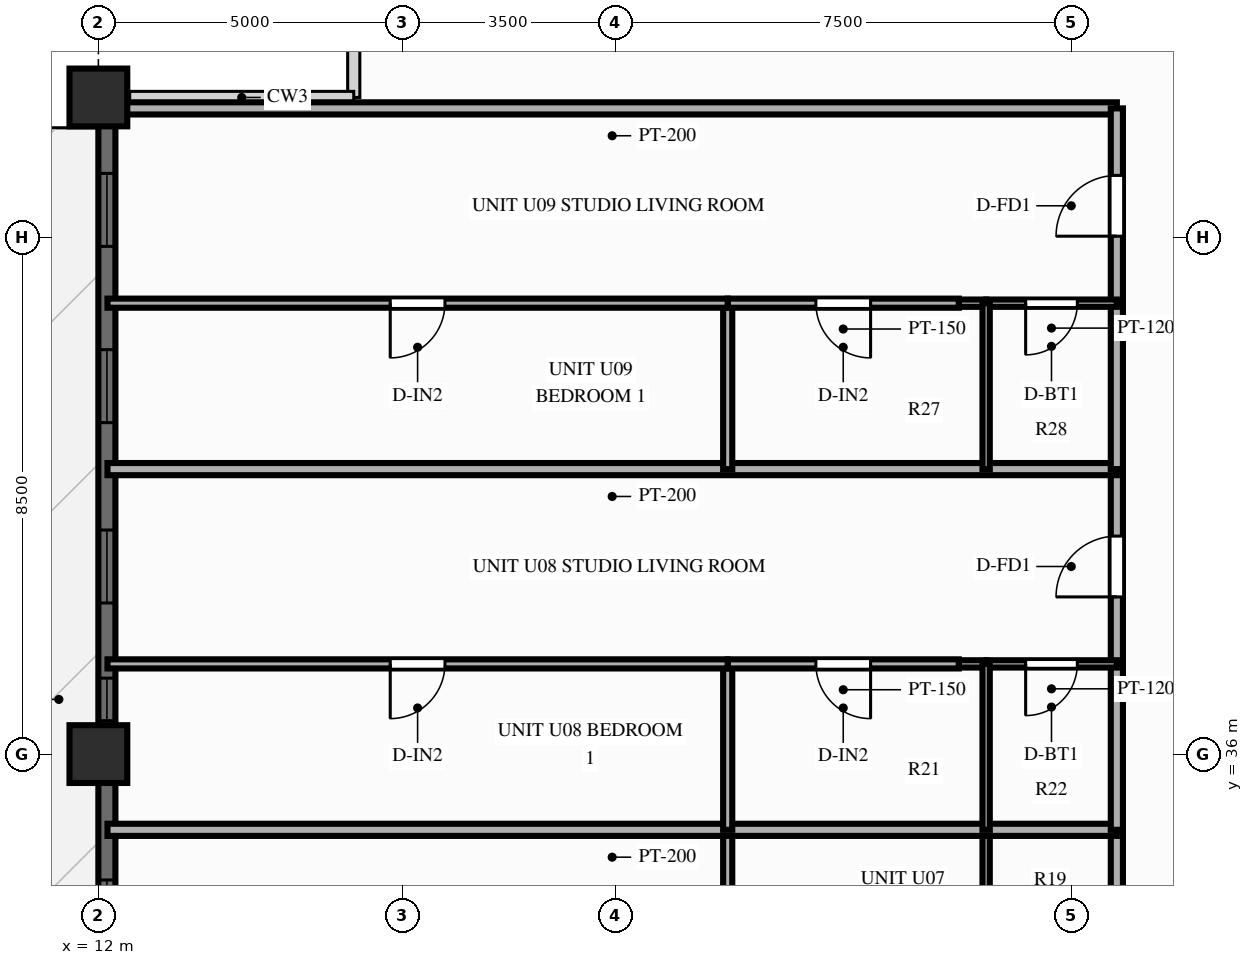
"""IFC4 building model, lengths in metres.
Left out: names, types, materials, properties, quantities, classifications, styles, units other than length and angle.
Written with IfcOpenShell. Run it as: python <this file> out.ifc"""

import sys

from ifc_helpers import new_model, si_unit, direction, frame, frame_2d, origin, origin_2d, place, context, subcontext, project, spatial, rectangle, extrude, source, transform, mapped, element, fill, save


model = new_model("IFC4")
c1 = context("Model", 3, precision=1e-05, world=origin(), true_north=direction((0.0, 1.0)))
c2 = subcontext(c1, "Body", "Model", "MODEL_VIEW")
j1 = project(units=[si_unit("LENGTHUNIT", "METRE"), si_unit("PLANEANGLEUNIT", "RADIAN")], contexts=[c1])
p1 = place(None, origin())
s1 = spatial("IfcSite", under=j1, at=p1, CompositionType="ELEMENT")
p2 = place(p1, origin())
s2 = spatial("IfcBuilding", under=s1, at=p2, CompositionType="ELEMENT")
p3 = place(p2, frame((0.0, 0.0, 116.85)))
s3 = spatial("IfcBuildingStorey", under=s2, at=p3, CompositionType="ELEMENT", Elevation=116.85)
m1 = source(origin(), c2, "Body", "SweptSolid", [
    extrude(rectangle(XDim=0.95, YDim=0.95, at=origin_2d()), origin(), (0.0, 0.0, 1.0), 3.0),
])
for number, where, z_axis, x_axis in (
    (1, (12.0, 46.8, 0.0), (0.0, 0.0, 1.0), (1.0, 0.0, 0.0)),
    (2, (12.0, 36.0, 0.0), (0.0, 0.0, 1.0), (1.0, 0.0, 0.0)),
):
    element("IfcColumn", number, at=place(p3, frame(where, z_axis=z_axis, x_axis=x_axis)), inside=s3, PredefinedType="COLUMN", context=c2, shape_type="MappedRepresentation", body=[
        mapped(m1, transform((0.0, 0.0, 0.0), scale=1.0)),
    ])
p4 = place(p3, frame((12.14, 7.2, 0.0), z_axis=(0.0, 0.0, 1.0), x_axis=(0.0, 1.0, 0.0)))
e3 = element("IfcWall", 3, at=p4, inside=s3, PredefinedType="SOLIDWALL", context=c2, shape_type="SweptSolid", body=[
    extrude(rectangle(XDim=39.6, YDim=0.28, at=frame_2d((19.8, 0.0))), origin(), (0.0, 0.0, 1.0), 2.28),
])
p5 = place(p4, frame((0.945, 0.0, 0.25)))
e4 = element("IfcOpeningElement", 4, at=p5, cuts=e3, PredefinedType="OPENING", context=c2, shape_type="SweptSolid", body=[
    extrude(rectangle(XDim=1.2, YDim=1.5, at=frame_2d((0.6, 0.75))), frame((0.0, 0.152, 0.0), z_axis=(0.0, -1.0, 0.0), x_axis=(1.0, 0.0, 0.0)), (0.0, 0.0, 1.0), 0.304),
])
p6 = place(p4, frame((4.213, 0.0, 0.25)))
e5 = element("IfcOpeningElement", 5, at=p6, cuts=e3, PredefinedType="OPENING", context=c2, shape_type="SweptSolid", body=[
    extrude(rectangle(XDim=1.2, YDim=1.5, at=frame_2d((0.6, 0.75))), frame((0.0, 0.152, 0.0), z_axis=(0.0, -1.0, 0.0), x_axis=(1.0, 0.0, 0.0)), (0.0, 0.0, 1.0), 0.304),
])
p7 = place(p4, frame((7.55, 0.0, 0.25)))
e6 = element("IfcOpeningElement", 6, at=p7, cuts=e3, PredefinedType="OPENING", context=c2, shape_type="SweptSolid", body=[
    extrude(rectangle(XDim=1.2, YDim=1.5, at=frame_2d((0.6, 0.75))), frame((0.0, 0.152, 0.0), z_axis=(0.0, -1.0, 0.0), x_axis=(1.0, 0.0, 0.0)), (0.0, 0.0, 1.0), 0.304),
])
p8 = place(p4, frame((13.483, 0.0, 0.25)))
e7 = element("IfcOpeningElement", 7, at=p8, cuts=e3, PredefinedType="OPENING", context=c2, shape_type="SweptSolid", body=[
    extrude(rectangle(XDim=1.2, YDim=1.5, at=frame_2d((0.6, 0.75))), frame((0.0, 0.152, 0.0), z_axis=(0.0, -1.0, 0.0), x_axis=(1.0, 0.0, 0.0)), (0.0, 0.0, 1.0), 0.304),
])
p9 = place(p4, frame((16.82, 0.0, 0.25)))
e8 = element("IfcOpeningElement", 8, at=p9, cuts=e3, PredefinedType="OPENING", context=c2, shape_type="SweptSolid", body=[
    extrude(rectangle(XDim=1.2, YDim=1.5, at=frame_2d((0.6, 0.75))), frame((0.0, 0.152, 0.0), z_axis=(0.0, -1.0, 0.0), x_axis=(1.0, 0.0, 0.0)), (0.0, 0.0, 1.0), 0.304),
])
p10 = place(p4, frame((19.2, 0.0, 0.25)))
e9 = element("IfcOpeningElement", 9, at=p10, cuts=e3, PredefinedType="OPENING", context=c2, shape_type="SweptSolid", body=[
    extrude(rectangle(XDim=1.2, YDim=1.5, at=frame_2d((0.6, 0.75))), frame((0.0, 0.152, 0.0), z_axis=(0.0, -1.0, 0.0), x_axis=(1.0, 0.0, 0.0)), (0.0, 0.0, 1.0), 0.304),
])
p11 = place(p4, frame((21.992, 0.0, 0.0)))
e10 = element("IfcOpeningElement", 10, at=p11, cuts=e3, PredefinedType="OPENING", context=c2, shape_type="SweptSolid", body=[
    extrude(rectangle(XDim=1.6, YDim=2.15, at=frame_2d((0.8, 1.075))), frame((0.0, 0.152, 0.0), z_axis=(0.0, -1.0, 0.0), x_axis=(1.0, 0.0, 0.0)), (0.0, 0.0, 1.0), 0.304),
])
p12 = place(p4, frame((25.529, 0.0, 0.25)))
e11 = element("IfcOpeningElement", 11, at=p12, cuts=e3, PredefinedType="OPENING", context=c2, shape_type="SweptSolid", body=[
    extrude(rectangle(XDim=1.2, YDim=1.5, at=frame_2d((0.6, 0.75))), frame((0.0, 0.152, 0.0), z_axis=(0.0, -1.0, 0.0), x_axis=(1.0, 0.0, 0.0)), (0.0, 0.0, 1.0), 0.304),
])
p13 = place(p4, frame((29.349, 0.0, 0.25)))
e12 = element("IfcOpeningElement", 12, at=p13, cuts=e3, PredefinedType="OPENING", context=c2, shape_type="SweptSolid", body=[
    extrude(rectangle(XDim=0.7, YDim=1.5, at=frame_2d((0.35, 0.75))), frame((0.0, 0.152, 0.0), z_axis=(0.0, -1.0, 0.0), x_axis=(1.0, 0.0, 0.0)), (0.0, 0.0, 1.0), 0.304),
])
p14 = place(p4, frame((31.285, 0.0, 0.25)))
e13 = element("IfcOpeningElement", 13, at=p14, cuts=e3, PredefinedType="OPENING", context=c2, shape_type="SweptSolid", body=[
    extrude(rectangle(XDim=1.2, YDim=1.5, at=frame_2d((0.6, 0.75))), frame((0.0, 0.152, 0.0), z_axis=(0.0, -1.0, 0.0), x_axis=(1.0, 0.0, 0.0)), (0.0, 0.0, 1.0), 0.304),
])
p15 = place(p4, frame((34.252, 0.0, 0.25)))
e14 = element("IfcOpeningElement", 14, at=p15, cuts=e3, PredefinedType="OPENING", context=c2, shape_type="SweptSolid", body=[
    extrude(rectangle(XDim=1.2, YDim=1.5, at=frame_2d((0.6, 0.75))), frame((0.0, 0.152, 0.0), z_axis=(0.0, -1.0, 0.0), x_axis=(1.0, 0.0, 0.0)), (0.0, 0.0, 1.0), 0.304),
])
p16 = place(p4, frame((37.151, 0.0, 0.25)))
e15 = element("IfcOpeningElement", 15, at=p16, cuts=e3, PredefinedType="OPENING", context=c2, shape_type="SweptSolid", body=[
    extrude(rectangle(XDim=1.2, YDim=1.5, at=frame_2d((0.6, 0.75))), frame((0.0, 0.152, 0.0), z_axis=(0.0, -1.0, 0.0), x_axis=(1.0, 0.0, 0.0)), (0.0, 0.0, 1.0), 0.304),
])
p17 = place(p3, frame((28.75, 46.62, 0.0), z_axis=(0.0, 0.0, 1.0), x_axis=(-1.0, 0.0, 0.0)))
e16 = element("IfcWall", 16, at=p17, inside=s3, PredefinedType="PARTITIONING", context=c2, shape_type="SweptSolid", body=[
    extrude(rectangle(XDim=16.6, YDim=0.2, at=frame_2d((8.3, 0.0))), origin(), (0.0, 0.0, 1.0), 2.79),
])
p18 = place(p3, frame((28.75, 31.904, 0.0), z_axis=(0.0, 0.0, 1.0), x_axis=(0.0, 1.0, 0.0)))
e17 = element("IfcWall", 17, at=p18, inside=s3, PredefinedType="PARTITIONING", context=c2, shape_type="SweptSolid", body=[
    extrude(rectangle(XDim=2.85, YDim=0.2, at=frame_2d((1.425, 0.0))), origin(), (0.0, 0.0, 1.0), 2.79),
])
p19 = place(p3, frame((26.6, 31.904, 0.0), z_axis=(0.0, 0.0, 1.0), x_axis=(0.0, 1.0, 0.0)))
e18 = element("IfcWall", 18, at=p19, inside=s3, PredefinedType="PARTITIONING", context=c2, shape_type="SweptSolid", body=[
    extrude(rectangle(XDim=2.85, YDim=0.12, at=frame_2d((1.425, 0.0))), origin(), (0.0, 0.0, 1.0), 2.79),
])
p20 = place(p3, frame((22.35, 31.904, 0.0), z_axis=(0.0, 0.0, 1.0), x_axis=(0.0, 1.0, 0.0)))
e19 = element("IfcWall", 19, at=p20, inside=s3, PredefinedType="PARTITIONING", context=c2, shape_type="SweptSolid", body=[
    extrude(rectangle(XDim=2.85, YDim=0.15, at=frame_2d((1.425, 0.0))), origin(), (0.0, 0.0, 1.0), 2.79),
])
p21 = place(p3, frame((28.75, 34.754, 0.0), z_axis=(0.0, 0.0, 1.0), x_axis=(-1.0, 0.0, 0.0)))
e20 = element("IfcWall", 20, at=p21, inside=s3, PredefinedType="PARTITIONING", context=c2, shape_type="SweptSolid", body=[
    extrude(rectangle(XDim=16.6, YDim=0.2, at=frame_2d((8.3, 0.0))), origin(), (0.0, 0.0, 1.0), 2.79),
])
p22 = place(p3, frame((28.75, 34.754, 0.0), z_axis=(0.0, 0.0, 1.0), x_axis=(0.0, 1.0, 0.0)))
e21 = element("IfcWall", 21, at=p22, inside=s3, PredefinedType="PARTITIONING", context=c2, shape_type="SweptSolid", body=[
    extrude(rectangle(XDim=2.729, YDim=0.2, at=frame_2d((1.365, 0.0))), origin(), (0.0, 0.0, 1.0), 2.79),
])
p23 = place(p3, frame((28.75, 37.483, 0.0), z_axis=(0.0, 0.0, 1.0), x_axis=(0.0, 1.0, 0.0)))
e22 = element("IfcWall", 22, at=p23, inside=s3, PredefinedType="PARTITIONING", context=c2, shape_type="SweptSolid", body=[
    extrude(rectangle(XDim=3.204, YDim=0.2, at=frame_2d((1.602, 0.0))), origin(), (0.0, 0.0, 1.0), 2.79),
])
p24 = place(p23, frame((1.102, 0.0, 0.0)))
e23 = element("IfcOpeningElement", 23, at=p24, cuts=e22, PredefinedType="OPENING", context=c2, shape_type="SweptSolid", body=[
    extrude(rectangle(XDim=1.0, YDim=2.15, at=frame_2d((0.5, 1.075))), frame((0.0, 0.112, 0.0), z_axis=(0.0, -1.0, 0.0), x_axis=(1.0, 0.0, 0.0)), (0.0, 0.0, 1.0), 0.224),
])
p25 = place(p3, frame((28.75, 37.483, 0.0), z_axis=(0.0, 0.0, 1.0), x_axis=(-1.0, 0.0, 0.0)))
e24 = element("IfcWall", 24, at=p25, inside=s3, PredefinedType="PARTITIONING", context=c2, shape_type="SweptSolid", body=[
    extrude(rectangle(XDim=2.15, YDim=0.12, at=frame_2d((1.075, 0.0))), origin(), (0.0, 0.0, 1.0), 2.79),
])
p26 = place(p25, frame((0.65, 0.0, 0.0)))
e25 = element("IfcOpeningElement", 25, at=p26, cuts=e24, PredefinedType="OPENING", context=c2, shape_type="SweptSolid", body=[
    extrude(rectangle(XDim=0.85, YDim=2.05, at=frame_2d((0.425, 1.025))), frame((0.0, 0.072, 0.0), z_axis=(0.0, -1.0, 0.0), x_axis=(1.0, 0.0, 0.0)), (0.0, 0.0, 1.0), 0.144),
])
p27 = place(p3, frame((26.6, 37.483, 0.0), z_axis=(0.0, 0.0, 1.0), x_axis=(-1.0, 0.0, 0.0)))
e26 = element("IfcWall", 26, at=p27, inside=s3, PredefinedType="PARTITIONING", context=c2, shape_type="SweptSolid", body=[
    extrude(rectangle(XDim=0.45, YDim=0.12, at=frame_2d((0.225, 0.0))), origin(), (0.0, 0.0, 1.0), 2.79),
])
p28 = place(p3, frame((26.6, 34.754, 0.0), z_axis=(0.0, 0.0, 1.0), x_axis=(0.0, 1.0, 0.0)))
e27 = element("IfcWall", 27, at=p28, inside=s3, PredefinedType="PARTITIONING", context=c2, shape_type="SweptSolid", body=[
    extrude(rectangle(XDim=2.729, YDim=0.12, at=frame_2d((1.365, 0.0))), origin(), (0.0, 0.0, 1.0), 2.79),
])
p29 = place(p3, frame((22.35, 34.754, 0.0), z_axis=(0.0, 0.0, 1.0), x_axis=(0.0, 1.0, 0.0)))
e28 = element("IfcWall", 28, at=p29, inside=s3, PredefinedType="PARTITIONING", context=c2, shape_type="SweptSolid", body=[
    extrude(rectangle(XDim=2.729, YDim=0.15, at=frame_2d((1.365, 0.0))), origin(), (0.0, 0.0, 1.0), 2.79),
])
p30 = place(p3, frame((26.15, 37.483, 0.0), z_axis=(0.0, 0.0, 1.0), x_axis=(-1.0, 0.0, 0.0)))
e29 = element("IfcWall", 29, at=p30, inside=s3, PredefinedType="PARTITIONING", context=c2, shape_type="SweptSolid", body=[
    extrude(rectangle(XDim=3.8, YDim=0.15, at=frame_2d((1.9, 0.0))), origin(), (0.0, 0.0, 1.0), 2.79),
])
p31 = place(p30, frame((1.45, 0.0, 0.0)))
e30 = element("IfcOpeningElement", 30, at=p31, cuts=e29, PredefinedType="OPENING", context=c2, shape_type="SweptSolid", body=[
    extrude(rectangle(XDim=0.9, YDim=2.1, at=frame_2d((0.45, 1.05))), frame((0.0, 0.087, 0.0), z_axis=(0.0, -1.0, 0.0), x_axis=(1.0, 0.0, 0.0)), (0.0, 0.0, 1.0), 0.174),
])
p32 = place(p3, frame((22.35, 37.483, 0.0), z_axis=(0.0, 0.0, 1.0), x_axis=(-1.0, 0.0, 0.0)))
e31 = element("IfcWall", 31, at=p32, inside=s3, PredefinedType="PARTITIONING", context=c2, shape_type="SweptSolid", body=[
    extrude(rectangle(XDim=10.2, YDim=0.15, at=frame_2d((5.1, 0.0))), origin(), (0.0, 0.0, 1.0), 2.79),
])
p33 = place(p32, frame((4.65, 0.0, 0.0)))
e32 = element("IfcOpeningElement", 32, at=p33, cuts=e31, PredefinedType="OPENING", context=c2, shape_type="SweptSolid", body=[
    extrude(rectangle(XDim=0.9, YDim=2.1, at=frame_2d((0.45, 1.05))), frame((0.0, 0.087, 0.0), z_axis=(0.0, -1.0, 0.0), x_axis=(1.0, 0.0, 0.0)), (0.0, 0.0, 1.0), 0.174),
])
p34 = place(p3, frame((28.75, 40.687, 0.0), z_axis=(0.0, 0.0, 1.0), x_axis=(-1.0, 0.0, 0.0)))
e33 = element("IfcWall", 33, at=p34, inside=s3, PredefinedType="PARTITIONING", context=c2, shape_type="SweptSolid", body=[
    extrude(rectangle(XDim=16.6, YDim=0.2, at=frame_2d((8.3, 0.0))), origin(), (0.0, 0.0, 1.0), 2.79),
])
p35 = place(p3, frame((28.75, 40.687, 0.0), z_axis=(0.0, 0.0, 1.0), x_axis=(0.0, 1.0, 0.0)))
e34 = element("IfcWall", 34, at=p35, inside=s3, PredefinedType="PARTITIONING", context=c2, shape_type="SweptSolid", body=[
    extrude(rectangle(XDim=2.729, YDim=0.2, at=frame_2d((1.365, 0.0))), origin(), (0.0, 0.0, 1.0), 2.79),
])
p36 = place(p3, frame((28.75, 43.416, 0.0), z_axis=(0.0, 0.0, 1.0), x_axis=(0.0, 1.0, 0.0)))
e35 = element("IfcWall", 35, at=p36, inside=s3, PredefinedType="PARTITIONING", context=c2, shape_type="SweptSolid", body=[
    extrude(rectangle(XDim=3.204, YDim=0.2, at=frame_2d((1.602, 0.0))), origin(), (0.0, 0.0, 1.0), 2.79),
])
p37 = place(p36, frame((1.102, 0.0, 0.0)))
e36 = element("IfcOpeningElement", 36, at=p37, cuts=e35, PredefinedType="OPENING", context=c2, shape_type="SweptSolid", body=[
    extrude(rectangle(XDim=1.0, YDim=2.15, at=frame_2d((0.5, 1.075))), frame((0.0, 0.112, 0.0), z_axis=(0.0, -1.0, 0.0), x_axis=(1.0, 0.0, 0.0)), (0.0, 0.0, 1.0), 0.224),
])
p38 = place(p3, frame((28.75, 43.416, 0.0), z_axis=(0.0, 0.0, 1.0), x_axis=(-1.0, 0.0, 0.0)))
e37 = element("IfcWall", 37, at=p38, inside=s3, PredefinedType="PARTITIONING", context=c2, shape_type="SweptSolid", body=[
    extrude(rectangle(XDim=2.15, YDim=0.12, at=frame_2d((1.075, 0.0))), origin(), (0.0, 0.0, 1.0), 2.79),
])
p39 = place(p38, frame((0.65, 0.0, 0.0)))
e38 = element("IfcOpeningElement", 38, at=p39, cuts=e37, PredefinedType="OPENING", context=c2, shape_type="SweptSolid", body=[
    extrude(rectangle(XDim=0.85, YDim=2.05, at=frame_2d((0.425, 1.025))), frame((0.0, 0.072, 0.0), z_axis=(0.0, -1.0, 0.0), x_axis=(1.0, 0.0, 0.0)), (0.0, 0.0, 1.0), 0.144),
])
p40 = place(p3, frame((26.6, 43.416, 0.0), z_axis=(0.0, 0.0, 1.0), x_axis=(-1.0, 0.0, 0.0)))
e39 = element("IfcWall", 39, at=p40, inside=s3, PredefinedType="PARTITIONING", context=c2, shape_type="SweptSolid", body=[
    extrude(rectangle(XDim=0.45, YDim=0.12, at=frame_2d((0.225, 0.0))), origin(), (0.0, 0.0, 1.0), 2.79),
])
p41 = place(p3, frame((26.6, 40.687, 0.0), z_axis=(0.0, 0.0, 1.0), x_axis=(0.0, 1.0, 0.0)))
e40 = element("IfcWall", 40, at=p41, inside=s3, PredefinedType="PARTITIONING", context=c2, shape_type="SweptSolid", body=[
    extrude(rectangle(XDim=2.729, YDim=0.12, at=frame_2d((1.365, 0.0))), origin(), (0.0, 0.0, 1.0), 2.79),
])
p42 = place(p3, frame((22.35, 40.687, 0.0), z_axis=(0.0, 0.0, 1.0), x_axis=(0.0, 1.0, 0.0)))
e41 = element("IfcWall", 41, at=p42, inside=s3, PredefinedType="PARTITIONING", context=c2, shape_type="SweptSolid", body=[
    extrude(rectangle(XDim=2.729, YDim=0.15, at=frame_2d((1.365, 0.0))), origin(), (0.0, 0.0, 1.0), 2.79),
])
p43 = place(p3, frame((26.15, 43.416, 0.0), z_axis=(0.0, 0.0, 1.0), x_axis=(-1.0, 0.0, 0.0)))
e42 = element("IfcWall", 42, at=p43, inside=s3, PredefinedType="PARTITIONING", context=c2, shape_type="SweptSolid", body=[
    extrude(rectangle(XDim=3.8, YDim=0.15, at=frame_2d((1.9, 0.0))), origin(), (0.0, 0.0, 1.0), 2.79),
])
p44 = place(p43, frame((1.45, 0.0, 0.0)))
e43 = element("IfcOpeningElement", 43, at=p44, cuts=e42, PredefinedType="OPENING", context=c2, shape_type="SweptSolid", body=[
    extrude(rectangle(XDim=0.9, YDim=2.1, at=frame_2d((0.45, 1.05))), frame((0.0, 0.087, 0.0), z_axis=(0.0, -1.0, 0.0), x_axis=(1.0, 0.0, 0.0)), (0.0, 0.0, 1.0), 0.174),
])
p45 = place(p3, frame((22.35, 43.416, 0.0), z_axis=(0.0, 0.0, 1.0), x_axis=(-1.0, 0.0, 0.0)))
e44 = element("IfcWall", 44, at=p45, inside=s3, PredefinedType="PARTITIONING", context=c2, shape_type="SweptSolid", body=[
    extrude(rectangle(XDim=10.2, YDim=0.15, at=frame_2d((5.1, 0.0))), origin(), (0.0, 0.0, 1.0), 2.79),
])
p46 = place(p45, frame((4.65, 0.0, 0.0)))
e45 = element("IfcOpeningElement", 45, at=p46, cuts=e44, PredefinedType="OPENING", context=c2, shape_type="SweptSolid", body=[
    extrude(rectangle(XDim=0.9, YDim=2.1, at=frame_2d((0.45, 1.05))), frame((0.0, 0.087, 0.0), z_axis=(0.0, -1.0, 0.0), x_axis=(1.0, 0.0, 0.0)), (0.0, 0.0, 1.0), 0.174),
])
m2 = source(origin(), c2, "Body", "SweptSolid", [
    extrude(rectangle(XDim=1.2, YDim=1.5, at=frame_2d((0.6, 0.75))), frame((0.0, 0.03, 0.0), z_axis=(0.0, -1.0, 0.0), x_axis=(1.0, 0.0, 0.0)), (0.0, 0.0, 1.0), 0.06),
])
p47 = place(p12, origin())
e46 = element("IfcWindow", 46, at=p47, inside=s3, PartitioningType="SINGLE_PANEL", PredefinedType="WINDOW", context=c2, shape_type="MappedRepresentation", body=[
    mapped(m2, transform((0.0, 0.0, 0.0), scale=1.0)),
])
fill(e11, e46)
m3 = source(origin(), c2, "Body", "SweptSolid", [
    extrude(rectangle(XDim=0.7, YDim=1.5, at=frame_2d((0.35, 0.75))), frame((0.0, 0.03, 0.0), z_axis=(0.0, -1.0, 0.0), x_axis=(1.0, 0.0, 0.0)), (0.0, 0.0, 1.0), 0.06),
])
p48 = place(p13, origin())
e47 = element("IfcWindow", 47, at=p48, inside=s3, PartitioningType="SINGLE_PANEL", PredefinedType="WINDOW", context=c2, shape_type="MappedRepresentation", body=[
    mapped(m3, transform((0.0, 0.0, 0.0), scale=1.0)),
])
fill(e12, e47)
p49 = place(p14, origin())
e48 = element("IfcWindow", 48, at=p49, inside=s3, PartitioningType="SINGLE_PANEL", PredefinedType="WINDOW", context=c2, shape_type="MappedRepresentation", body=[
    mapped(m2, transform((0.0, 0.0, 0.0), scale=1.0)),
])
fill(e13, e48)
p50 = place(p15, origin())
e49 = element("IfcWindow", 49, at=p50, inside=s3, PartitioningType="SINGLE_PANEL", PredefinedType="WINDOW", context=c2, shape_type="MappedRepresentation", body=[
    mapped(m2, transform((0.0, 0.0, 0.0), scale=1.0)),
])
fill(e14, e49)
p51 = place(p16, origin())
e50 = element("IfcWindow", 50, at=p51, inside=s3, PartitioningType="SINGLE_PANEL", PredefinedType="WINDOW", context=c2, shape_type="MappedRepresentation", body=[
    mapped(m2, transform((0.0, 0.0, 0.0), scale=1.0)),
])
fill(e15, e50)
m4 = source(origin(), c2, "Body", "SweptSolid", [
    extrude(rectangle(XDim=1.0, YDim=2.15, at=frame_2d((0.5, 1.075))), frame((0.0, 0.025, 0.0), z_axis=(0.0, -1.0, 0.0), x_axis=(1.0, 0.0, 0.0)), (0.0, 0.0, 1.0), 0.05),
])
p52 = place(p24, origin())
e51 = element("IfcDoor", 51, at=p52, inside=s3, OperationType="SINGLE_SWING_LEFT", PredefinedType="DOOR", context=c2, shape_type="MappedRepresentation", body=[
    mapped(m4, transform((0.0, 0.0, 0.0), scale=1.0)),
])
fill(e23, e51)
m5 = source(origin(), c2, "Body", "SweptSolid", [
    extrude(rectangle(XDim=0.85, YDim=2.05, at=frame_2d((0.425, 1.025))), frame((0.0, 0.025, 0.0), z_axis=(0.0, -1.0, 0.0), x_axis=(1.0, 0.0, 0.0)), (0.0, 0.0, 1.0), 0.05),
])
p53 = place(p26, origin())
e52 = element("IfcDoor", 52, at=p53, inside=s3, OperationType="SINGLE_SWING_RIGHT", PredefinedType="DOOR", context=c2, shape_type="MappedRepresentation", body=[
    mapped(m5, transform((0.0, 0.0, 0.0), scale=1.0)),
])
fill(e25, e52)
m6 = source(origin(), c2, "Body", "SweptSolid", [
    extrude(rectangle(XDim=0.9, YDim=2.1, at=frame_2d((0.45, 1.05))), frame((0.0, 0.025, 0.0), z_axis=(0.0, -1.0, 0.0), x_axis=(1.0, 0.0, 0.0)), (0.0, 0.0, 1.0), 0.05),
])
p54 = place(p31, origin())
e53 = element("IfcDoor", 53, at=p54, inside=s3, OperationType="SINGLE_SWING_LEFT", PredefinedType="DOOR", context=c2, shape_type="MappedRepresentation", body=[
    mapped(m6, transform((0.0, 0.0, 0.0), scale=1.0)),
])
fill(e30, e53)
p55 = place(p33, origin())
e54 = element("IfcDoor", 54, at=p55, inside=s3, OperationType="SINGLE_SWING_RIGHT", PredefinedType="DOOR", context=c2, shape_type="MappedRepresentation", body=[
    mapped(m6, transform((0.0, 0.0, 0.0), scale=1.0)),
])
fill(e32, e54)
p56 = place(p37, origin())
e55 = element("IfcDoor", 55, at=p56, inside=s3, OperationType="SINGLE_SWING_LEFT", PredefinedType="DOOR", context=c2, shape_type="MappedRepresentation", body=[
    mapped(m4, transform((0.0, 0.0, 0.0), scale=1.0)),
])
fill(e36, e55)
p57 = place(p39, origin())
e56 = element("IfcDoor", 56, at=p57, inside=s3, OperationType="SINGLE_SWING_RIGHT", PredefinedType="DOOR", context=c2, shape_type="MappedRepresentation", body=[
    mapped(m5, transform((0.0, 0.0, 0.0), scale=1.0)),
])
fill(e38, e56)
p58 = place(p44, origin())
e57 = element("IfcDoor", 57, at=p58, inside=s3, OperationType="SINGLE_SWING_LEFT", PredefinedType="DOOR", context=c2, shape_type="MappedRepresentation", body=[
    mapped(m6, transform((0.0, 0.0, 0.0), scale=1.0)),
])
fill(e43, e57)
p59 = place(p46, origin())
e58 = element("IfcDoor", 58, at=p59, inside=s3, OperationType="SINGLE_SWING_RIGHT", PredefinedType="DOOR", context=c2, shape_type="MappedRepresentation", body=[
    mapped(m6, transform((0.0, 0.0, 0.0), scale=1.0)),
])
fill(e45, e58)
save(model, sys.argv[1])
